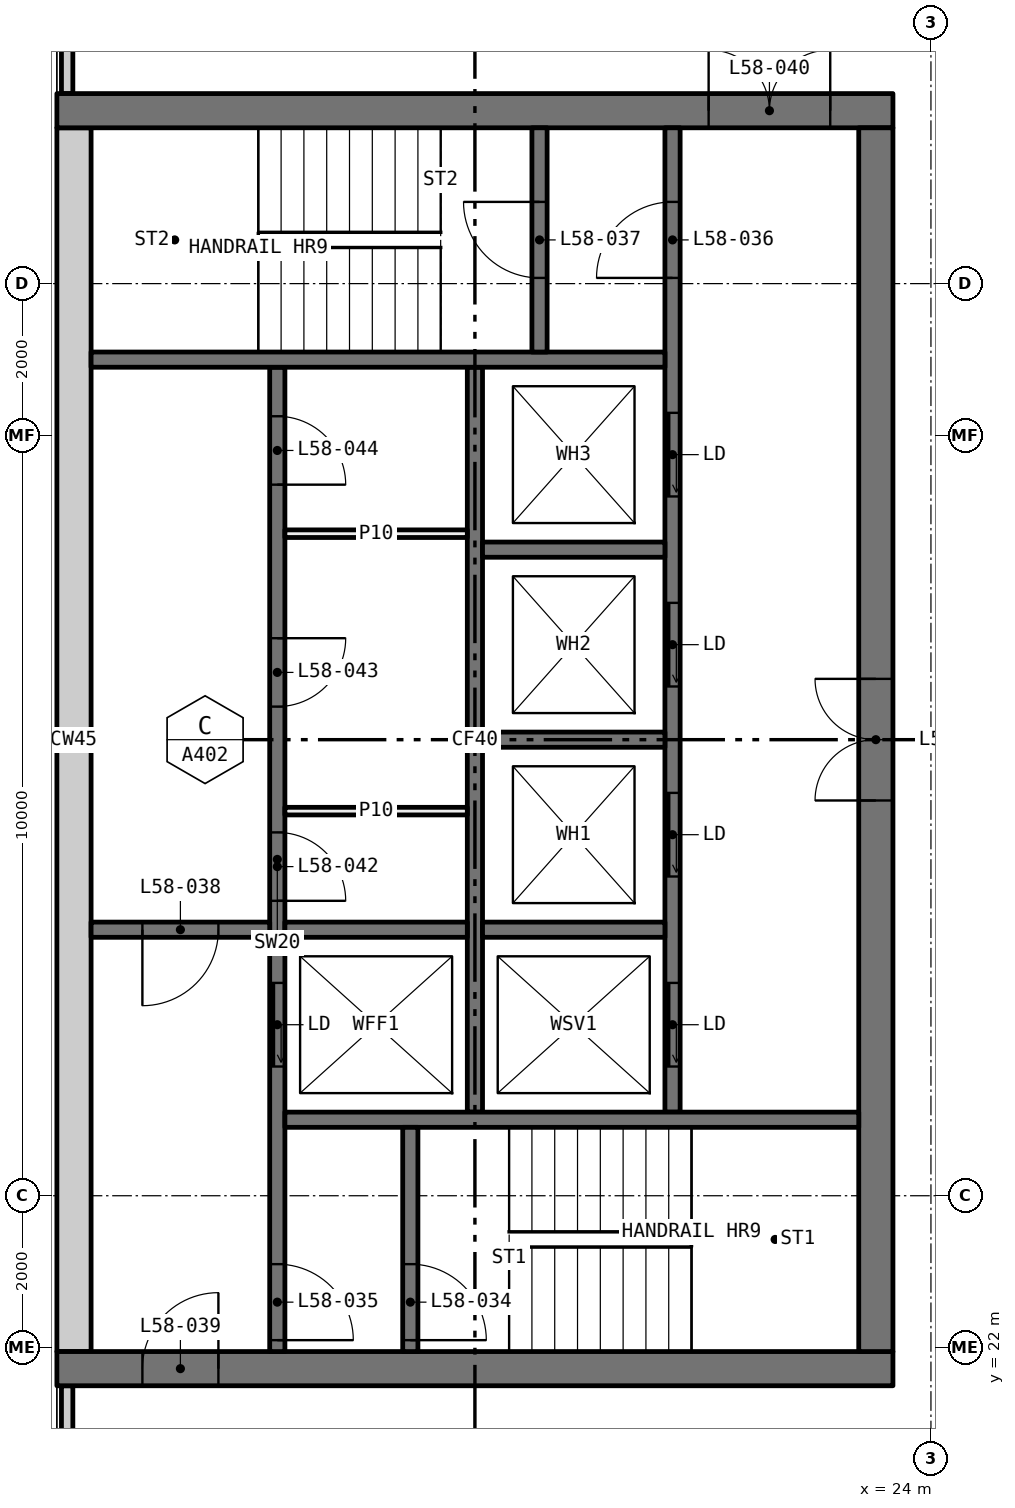
"""IFC4 building model, lengths in metres.
Left out: names, types, materials, properties, quantities, classifications, styles, units other than length and angle.
Written with IfcOpenShell. Run it as: python <this file> out.ifc"""

import sys

from ifc_helpers import new_model, si_unit, direction, frame, frame_2d, origin, place, context, subcontext, project, spatial, rectangle, extrude, element, fill, save


model = new_model("IFC4")
c1 = context("Model", 3, precision=1e-05, world=origin(), true_north=direction((0.0, 1.0)))
c2 = subcontext(c1, "Body", "Model", "MODEL_VIEW")
j1 = project(units=[si_unit("LENGTHUNIT", "METRE"), si_unit("PLANEANGLEUNIT", "RADIAN")], contexts=[c1])
p1 = place(None, origin())
s1 = spatial("IfcSite", under=j1, at=p1, CompositionType="ELEMENT")
p2 = place(p1, origin())
s2 = spatial("IfcBuilding", under=s1, at=p2, CompositionType="ELEMENT")
p3 = place(p2, frame((0.0, 0.0, 217.95)))
s3 = spatial("IfcBuildingStorey", under=s2, at=p3, CompositionType="ELEMENT", Elevation=217.95)
for number, where, z_axis, x_axis in (
    (1, (12.635, 18.71, 0.0), (0.0, 0.0, 1.0), (0.0, 1.0, 0.0)),
    (2, (12.635, 38.5, 0.0), (0.0, 0.0, 1.0), (0.0, 1.0, 0.0)),
):
    element("IfcWall", number, at=place(p3, frame(where, z_axis=z_axis, x_axis=x_axis)), inside=s3, PredefinedType="ELEMENTEDWALL", context=c2, shape_type="SweptSolid", body=[
        extrude(rectangle(XDim=2.79, YDim=0.15, at=frame_2d((1.395, 0.0))), origin(), (0.0, 0.0, 1.0), 3.05),
    ])
p4 = place(p3, frame((12.5, 21.725, 0.0), z_axis=(0.0, 0.0, 1.0), x_axis=(1.0, 0.0, 0.0)))
e3 = element("IfcWall", 3, at=p4, inside=s3, PredefinedType="SHEAR", context=c2, shape_type="SweptSolid", body=[
    extrude(rectangle(XDim=11.0, YDim=0.45, at=frame_2d((5.5, 0.0))), origin(), (0.0, 0.0, 1.0), 3.05),
])
p5 = place(p4, frame((1.125, 0.0, 0.0)))
e4 = element("IfcOpeningElement", 4, at=p5, cuts=e3, PredefinedType="OPENING", context=c2, shape_type="SweptSolid", body=[
    extrude(rectangle(XDim=1.0, YDim=2.1, at=frame_2d((0.5, 1.05))), frame((0.0, 0.235, 0.0), z_axis=(0.0, -1.0, 0.0), x_axis=(1.0, 0.0, 0.0)), (0.0, 0.0, 1.0), 0.47),
])
p6 = place(p3, frame((12.5, 38.275, 0.0), z_axis=(0.0, 0.0, 1.0), x_axis=(1.0, 0.0, 0.0)))
e5 = element("IfcWall", 5, at=p6, inside=s3, PredefinedType="SHEAR", context=c2, shape_type="SweptSolid", body=[
    extrude(rectangle(XDim=11.0, YDim=0.45, at=frame_2d((5.5, 0.0))), origin(), (0.0, 0.0, 1.0), 3.05),
])
p7 = place(p6, frame((8.575, 0.0, 0.0)))
e6 = element("IfcOpeningElement", 6, at=p7, cuts=e5, PredefinedType="OPENING", context=c2, shape_type="SweptSolid", body=[
    extrude(rectangle(XDim=1.6, YDim=2.1, at=frame_2d((0.8, 1.05))), frame((0.0, 0.235, 0.0), z_axis=(0.0, -1.0, 0.0), x_axis=(1.0, 0.0, 0.0)), (0.0, 0.0, 1.0), 0.47),
])
p8 = place(p3, frame((12.725, 21.95, 0.0), z_axis=(0.0, 0.0, 1.0), x_axis=(0.0, 1.0, 0.0)))
e7 = element("IfcWall", 7, at=p8, inside=s3, PredefinedType="SHEAR", context=c2, shape_type="SweptSolid", body=[
    extrude(rectangle(XDim=16.1, YDim=0.45, at=frame_2d((8.05, 0.0))), origin(), (0.0, 0.0, 1.0), 3.05),
])
p9 = place(p3, frame((23.275, 21.95, 0.0), z_axis=(0.0, 0.0, 1.0), x_axis=(0.0, 1.0, 0.0)))
e8 = element("IfcWall", 8, at=p9, inside=s3, PredefinedType="SHEAR", context=c2, shape_type="SweptSolid", body=[
    extrude(rectangle(XDim=16.1, YDim=0.45, at=frame_2d((8.05, 0.0))), origin(), (0.0, 0.0, 1.0), 3.05),
])
p10 = place(p9, frame((7.25, 0.0, 0.0)))
e9 = element("IfcOpeningElement", 9, at=p10, cuts=e8, PredefinedType="OPENING", context=c2, shape_type="SweptSolid", body=[
    extrude(rectangle(XDim=1.6, YDim=2.1, at=frame_2d((0.8, 1.05))), frame((0.0, 0.235, 0.0), z_axis=(0.0, -1.0, 0.0), x_axis=(1.0, 0.0, 0.0)), (0.0, 0.0, 1.0), 0.47),
])
p11 = place(p3, frame((15.4, 21.95, 0.0), z_axis=(0.0, 0.0, 1.0), x_axis=(0.0, 1.0, 0.0)))
e10 = element("IfcWall", 10, at=p11, inside=s3, PredefinedType="SOLIDWALL", context=c2, shape_type="SweptSolid", body=[
    extrude(rectangle(XDim=12.95, YDim=0.2, at=frame_2d((6.475, 0.0))), origin(), (0.0, 0.0, 1.0), 3.05),
])
p12 = place(p11, frame((3.75, 0.0, 0.0)))
e11 = element("IfcOpeningElement", 11, at=p12, cuts=e10, PredefinedType="OPENING", context=c2, shape_type="SweptSolid", body=[
    extrude(rectangle(XDim=1.1, YDim=2.1, at=frame_2d((0.55, 1.05))), frame((0.0, 0.11, 0.0), z_axis=(0.0, -1.0, 0.0), x_axis=(1.0, 0.0, 0.0)), (0.0, 0.0, 1.0), 0.22),
])
p13 = place(p11, frame((0.15, 0.0, 0.0)))
e12 = element("IfcOpeningElement", 12, at=p13, cuts=e10, PredefinedType="OPENING", context=c2, shape_type="SweptSolid", body=[
    extrude(rectangle(XDim=1.0, YDim=2.1, at=frame_2d((0.5, 1.05))), frame((0.0, 0.11, 0.0), z_axis=(0.0, -1.0, 0.0), x_axis=(1.0, 0.0, 0.0)), (0.0, 0.0, 1.0), 0.22),
])
p14 = place(p11, frame((5.93, 0.0, 0.0)))
e13 = element("IfcOpeningElement", 13, at=p14, cuts=e10, PredefinedType="OPENING", context=c2, shape_type="SweptSolid", body=[
    extrude(rectangle(XDim=0.9, YDim=2.1, at=frame_2d((0.45, 1.05))), frame((0.0, 0.11, 0.0), z_axis=(0.0, -1.0, 0.0), x_axis=(1.0, 0.0, 0.0)), (0.0, 0.0, 1.0), 0.22),
])
p15 = place(p11, frame((8.485, 0.0, 0.0)))
e14 = element("IfcOpeningElement", 14, at=p15, cuts=e10, PredefinedType="OPENING", context=c2, shape_type="SweptSolid", body=[
    extrude(rectangle(XDim=0.9, YDim=2.1, at=frame_2d((0.45, 1.05))), frame((0.0, 0.11, 0.0), z_axis=(0.0, -1.0, 0.0), x_axis=(1.0, 0.0, 0.0)), (0.0, 0.0, 1.0), 0.22),
])
p16 = place(p11, frame((11.405, 0.0, 0.0)))
e15 = element("IfcOpeningElement", 15, at=p16, cuts=e10, PredefinedType="OPENING", context=c2, shape_type="SweptSolid", body=[
    extrude(rectangle(XDim=0.9, YDim=2.1, at=frame_2d((0.45, 1.05))), frame((0.0, 0.11, 0.0), z_axis=(0.0, -1.0, 0.0), x_axis=(1.0, 0.0, 0.0)), (0.0, 0.0, 1.0), 0.22),
])
p17 = place(p3, frame((20.6, 25.1, 0.0), z_axis=(0.0, 0.0, 1.0), x_axis=(0.0, 1.0, 0.0)))
e16 = element("IfcWall", 16, at=p17, inside=s3, PredefinedType="SOLIDWALL", context=c2, shape_type="SweptSolid", body=[
    extrude(rectangle(XDim=12.95, YDim=0.2, at=frame_2d((6.475, 0.0))), origin(), (0.0, 0.0, 1.0), 3.05),
])
p18 = place(p17, frame((0.6, 0.0, 0.0)))
e17 = element("IfcOpeningElement", 17, at=p18, cuts=e16, PredefinedType="OPENING", context=c2, shape_type="SweptSolid", body=[
    extrude(rectangle(XDim=1.1, YDim=2.1, at=frame_2d((0.55, 1.05))), frame((0.0, 0.11, 0.0), z_axis=(0.0, -1.0, 0.0), x_axis=(1.0, 0.0, 0.0)), (0.0, 0.0, 1.0), 0.22),
])
p19 = place(p17, frame((3.1, 0.0, 0.0)))
e18 = element("IfcOpeningElement", 18, at=p19, cuts=e16, PredefinedType="OPENING", context=c2, shape_type="SweptSolid", body=[
    extrude(rectangle(XDim=1.1, YDim=2.1, at=frame_2d((0.55, 1.05))), frame((0.0, 0.11, 0.0), z_axis=(0.0, -1.0, 0.0), x_axis=(1.0, 0.0, 0.0)), (0.0, 0.0, 1.0), 0.22),
])
p20 = place(p17, frame((5.6, 0.0, 0.0)))
e19 = element("IfcOpeningElement", 19, at=p20, cuts=e16, PredefinedType="OPENING", context=c2, shape_type="SweptSolid", body=[
    extrude(rectangle(XDim=1.1, YDim=2.1, at=frame_2d((0.55, 1.05))), frame((0.0, 0.11, 0.0), z_axis=(0.0, -1.0, 0.0), x_axis=(1.0, 0.0, 0.0)), (0.0, 0.0, 1.0), 0.22),
])
p21 = place(p17, frame((8.1, 0.0, 0.0)))
e20 = element("IfcOpeningElement", 20, at=p21, cuts=e16, PredefinedType="OPENING", context=c2, shape_type="SweptSolid", body=[
    extrude(rectangle(XDim=1.1, YDim=2.1, at=frame_2d((0.55, 1.05))), frame((0.0, 0.11, 0.0), z_axis=(0.0, -1.0, 0.0), x_axis=(1.0, 0.0, 0.0)), (0.0, 0.0, 1.0), 0.22),
])
p22 = place(p17, frame((10.975, 0.0, 0.0)))
e21 = element("IfcOpeningElement", 21, at=p22, cuts=e16, PredefinedType="OPENING", context=c2, shape_type="SweptSolid", body=[
    extrude(rectangle(XDim=1.0, YDim=2.1, at=frame_2d((0.5, 1.05))), frame((0.0, 0.11, 0.0), z_axis=(0.0, -1.0, 0.0), x_axis=(1.0, 0.0, 0.0)), (0.0, 0.0, 1.0), 0.22),
])
p23 = place(p3, frame((18.0, 25.1, 0.0), z_axis=(0.0, 0.0, 1.0), x_axis=(0.0, 1.0, 0.0)))
e22 = element("IfcWall", 22, at=p23, inside=s3, PredefinedType="SOLIDWALL", context=c2, shape_type="SweptSolid", body=[
    extrude(rectangle(XDim=9.8, YDim=0.2, at=frame_2d((4.9, 0.0))), origin(), (0.0, 0.0, 1.0), 3.05),
])
for number, where, z_axis, x_axis in (
    (23, (15.5, 25.0, 0.0), (0.0, 0.0, 1.0), (1.0, 0.0, 0.0)),
    (24, (12.95, 35.0, 0.0), (0.0, 0.0, 1.0), (1.0, 0.0, 0.0)),
):
    element("IfcWall", number, at=place(p3, frame(where, z_axis=z_axis, x_axis=x_axis)), inside=s3, PredefinedType="SOLIDWALL", context=c2, shape_type="SweptSolid", body=[
        extrude(rectangle(XDim=7.55, YDim=0.2, at=frame_2d((3.775, 0.0))), origin(), (0.0, 0.0, 1.0), 3.05),
    ])
p24 = place(p3, frame((12.95, 27.5, 0.0), z_axis=(0.0, 0.0, 1.0), x_axis=(1.0, 0.0, 0.0)))
e25 = element("IfcWall", 25, at=p24, inside=s3, PredefinedType="SOLIDWALL", context=c2, shape_type="SweptSolid", body=[
    extrude(rectangle(XDim=2.35, YDim=0.2, at=frame_2d((1.175, 0.0))), origin(), (0.0, 0.0, 1.0), 3.05),
])
p25 = place(p24, frame((0.675, 0.0, 0.0)))
e26 = element("IfcOpeningElement", 26, at=p25, cuts=e25, PredefinedType="OPENING", context=c2, shape_type="SweptSolid", body=[
    extrude(rectangle(XDim=1.0, YDim=2.1, at=frame_2d((0.5, 1.05))), frame((0.0, 0.11, 0.0), z_axis=(0.0, -1.0, 0.0), x_axis=(1.0, 0.0, 0.0)), (0.0, 0.0, 1.0), 0.22),
])
p26 = place(p3, frame((17.15, 21.95, 0.0), z_axis=(0.0, 0.0, 1.0), x_axis=(0.0, 1.0, 0.0)))
e27 = element("IfcWall", 27, at=p26, inside=s3, PredefinedType="SOLIDWALL", context=c2, shape_type="SweptSolid", body=[
    extrude(rectangle(XDim=2.95, YDim=0.2, at=frame_2d((1.475, 0.0))), origin(), (0.0, 0.0, 1.0), 3.05),
])
p27 = place(p26, frame((0.15, 0.0, 0.0)))
e28 = element("IfcOpeningElement", 28, at=p27, cuts=e27, PredefinedType="OPENING", context=c2, shape_type="SweptSolid", body=[
    extrude(rectangle(XDim=1.0, YDim=2.1, at=frame_2d((0.5, 1.05))), frame((0.0, 0.11, 0.0), z_axis=(0.0, -1.0, 0.0), x_axis=(1.0, 0.0, 0.0)), (0.0, 0.0, 1.0), 0.22),
])
p28 = place(p3, frame((18.85, 35.1, 0.0), z_axis=(0.0, 0.0, 1.0), x_axis=(0.0, 1.0, 0.0)))
e29 = element("IfcWall", 29, at=p28, inside=s3, PredefinedType="SOLIDWALL", context=c2, shape_type="SweptSolid", body=[
    extrude(rectangle(XDim=2.95, YDim=0.2, at=frame_2d((1.475, 0.0))), origin(), (0.0, 0.0, 1.0), 3.05),
])
p29 = place(p28, frame((0.975, 0.0, 0.0)))
e30 = element("IfcOpeningElement", 30, at=p29, cuts=e29, PredefinedType="OPENING", context=c2, shape_type="SweptSolid", body=[
    extrude(rectangle(XDim=1.0, YDim=2.1, at=frame_2d((0.5, 1.05))), frame((0.0, 0.11, 0.0), z_axis=(0.0, -1.0, 0.0), x_axis=(1.0, 0.0, 0.0)), (0.0, 0.0, 1.0), 0.22),
])
for number, where, z_axis, x_axis in (
    (31, (15.5, 27.5, 0.0), (0.0, 0.0, 1.0), (1.0, 0.0, 0.0)),
    (32, (18.1, 27.5, 0.0), (0.0, 0.0, 1.0), (1.0, 0.0, 0.0)),
    (33, (18.1, 30.0, 0.0), (0.0, 0.0, 1.0), (1.0, 0.0, 0.0)),
    (34, (18.1, 32.5, 0.0), (0.0, 0.0, 1.0), (1.0, 0.0, 0.0)),
):
    element("IfcWall", number, at=place(p3, frame(where, z_axis=z_axis, x_axis=x_axis)), inside=s3, PredefinedType="SOLIDWALL", context=c2, shape_type="SweptSolid", body=[
        extrude(rectangle(XDim=2.4, YDim=0.2, at=frame_2d((1.2, 0.0))), origin(), (0.0, 0.0, 1.0), 3.05),
    ])
for number, where, z_axis, x_axis in (
    (35, (15.5, 29.06, 0.0), (0.0, 0.0, 1.0), (1.0, 0.0, 0.0)),
    (36, (15.5, 32.71, 0.0), (0.0, 0.0, 1.0), (1.0, 0.0, 0.0)),
):
    element("IfcWall", number, at=place(p3, frame(where, z_axis=z_axis, x_axis=x_axis)), inside=s3, PredefinedType="PARTITIONING", context=c2, shape_type="SweptSolid", body=[
        extrude(rectangle(XDim=2.4, YDim=0.1, at=frame_2d((1.2, 0.0))), origin(), (0.0, 0.0, 1.0), 3.05),
    ])
p30 = place(p18, origin())
e37 = element("IfcDoor", 37, at=p30, inside=s3, OperationType="SLIDING_TO_LEFT", PredefinedType="DOOR", context=c2, shape_type="SweptSolid", body=[
    extrude(rectangle(XDim=1.1, YDim=2.1, at=frame_2d((0.55, 1.05))), frame((0.0, 0.025, 0.0), z_axis=(0.0, -1.0, 0.0), x_axis=(1.0, 0.0, 0.0)), (0.0, 0.0, 1.0), 0.05),
])
fill(e17, e37)
p31 = place(p19, origin())
e38 = element("IfcDoor", 38, at=p31, inside=s3, OperationType="SLIDING_TO_LEFT", PredefinedType="DOOR", context=c2, shape_type="SweptSolid", body=[
    extrude(rectangle(XDim=1.1, YDim=2.1, at=frame_2d((0.55, 1.05))), frame((0.0, 0.025, 0.0), z_axis=(0.0, -1.0, 0.0), x_axis=(1.0, 0.0, 0.0)), (0.0, 0.0, 1.0), 0.05),
])
fill(e18, e38)
p32 = place(p20, origin())
e39 = element("IfcDoor", 39, at=p32, inside=s3, OperationType="SLIDING_TO_LEFT", PredefinedType="DOOR", context=c2, shape_type="SweptSolid", body=[
    extrude(rectangle(XDim=1.1, YDim=2.1, at=frame_2d((0.55, 1.05))), frame((0.0, 0.025, 0.0), z_axis=(0.0, -1.0, 0.0), x_axis=(1.0, 0.0, 0.0)), (0.0, 0.0, 1.0), 0.05),
])
fill(e19, e39)
p33 = place(p21, origin())
e40 = element("IfcDoor", 40, at=p33, inside=s3, OperationType="SLIDING_TO_LEFT", PredefinedType="DOOR", context=c2, shape_type="SweptSolid", body=[
    extrude(rectangle(XDim=1.1, YDim=2.1, at=frame_2d((0.55, 1.05))), frame((0.0, 0.025, 0.0), z_axis=(0.0, -1.0, 0.0), x_axis=(1.0, 0.0, 0.0)), (0.0, 0.0, 1.0), 0.05),
])
fill(e20, e40)
p34 = place(p12, origin())
e41 = element("IfcDoor", 41, at=p34, inside=s3, OperationType="SLIDING_TO_LEFT", PredefinedType="DOOR", context=c2, shape_type="SweptSolid", body=[
    extrude(rectangle(XDim=1.1, YDim=2.1, at=frame_2d((0.55, 1.05))), frame((0.0, 0.025, 0.0), z_axis=(0.0, -1.0, 0.0), x_axis=(1.0, 0.0, 0.0)), (0.0, 0.0, 1.0), 0.05),
])
fill(e11, e41)
p35 = place(p27, frame((1.0, 0.0, 0.0), x_axis=(-1.0, 0.0, 0.0)))
e42 = element("IfcDoor", 42, at=p35, inside=s3, OperationType="SINGLE_SWING_LEFT", PredefinedType="DOOR", context=c2, shape_type="SweptSolid", body=[
    extrude(rectangle(XDim=1.0, YDim=2.1, at=frame_2d((0.5, 1.05))), frame((0.0, 0.025, 0.0), z_axis=(0.0, -1.0, 0.0), x_axis=(1.0, 0.0, 0.0)), (0.0, 0.0, 1.0), 0.05),
])
fill(e28, e42)
p36 = place(p13, frame((1.0, 0.0, 0.0), x_axis=(-1.0, 0.0, 0.0)))
e43 = element("IfcDoor", 43, at=p36, inside=s3, OperationType="SINGLE_SWING_LEFT", PredefinedType="DOOR", context=c2, shape_type="SweptSolid", body=[
    extrude(rectangle(XDim=1.0, YDim=2.1, at=frame_2d((0.5, 1.05))), frame((0.0, 0.025, 0.0), z_axis=(0.0, -1.0, 0.0), x_axis=(1.0, 0.0, 0.0)), (0.0, 0.0, 1.0), 0.05),
])
fill(e12, e43)
p37 = place(p22, origin())
e44 = element("IfcDoor", 44, at=p37, inside=s3, OperationType="SINGLE_SWING_RIGHT", PredefinedType="DOOR", context=c2, shape_type="SweptSolid", body=[
    extrude(rectangle(XDim=1.0, YDim=2.1, at=frame_2d((0.5, 1.05))), frame((0.0, 0.025, 0.0), z_axis=(0.0, -1.0, 0.0), x_axis=(1.0, 0.0, 0.0)), (0.0, 0.0, 1.0), 0.05),
])
fill(e21, e44)
p38 = place(p29, origin())
e45 = element("IfcDoor", 45, at=p38, inside=s3, OperationType="SINGLE_SWING_LEFT", PredefinedType="DOOR", context=c2, shape_type="SweptSolid", body=[
    extrude(rectangle(XDim=1.0, YDim=2.1, at=frame_2d((0.5, 1.05))), frame((0.0, 0.025, 0.0), z_axis=(0.0, -1.0, 0.0), x_axis=(1.0, 0.0, 0.0)), (0.0, 0.0, 1.0), 0.05),
])
fill(e30, e45)
p39 = place(p25, frame((1.0, 0.0, 0.0), x_axis=(-1.0, 0.0, 0.0)))
e46 = element("IfcDoor", 46, at=p39, inside=s3, OperationType="SINGLE_SWING_LEFT", PredefinedType="DOOR", context=c2, shape_type="SweptSolid", body=[
    extrude(rectangle(XDim=1.0, YDim=2.1, at=frame_2d((0.5, 1.05))), frame((0.0, 0.025, 0.0), z_axis=(0.0, -1.0, 0.0), x_axis=(1.0, 0.0, 0.0)), (0.0, 0.0, 1.0), 0.05),
])
fill(e26, e46)
p40 = place(p5, origin())
e47 = element("IfcDoor", 47, at=p40, inside=s3, OperationType="SINGLE_SWING_LEFT", PredefinedType="DOOR", context=c2, shape_type="SweptSolid", body=[
    extrude(rectangle(XDim=1.0, YDim=2.1, at=frame_2d((0.5, 1.05))), frame((0.0, 0.025, 0.0), z_axis=(0.0, -1.0, 0.0), x_axis=(1.0, 0.0, 0.0)), (0.0, 0.0, 1.0), 0.05),
])
fill(e4, e47)
p41 = place(p7, origin())
e48 = element("IfcDoor", 48, at=p41, inside=s3, OperationType="DOUBLE_DOOR_SINGLE_SWING", PredefinedType="DOOR", context=c2, shape_type="SweptSolid", body=[
    extrude(rectangle(XDim=1.6, YDim=2.1, at=frame_2d((0.8, 1.05))), frame((0.0, 0.025, 0.0), z_axis=(0.0, -1.0, 0.0), x_axis=(1.0, 0.0, 0.0)), (0.0, 0.0, 1.0), 0.05),
])
fill(e6, e48)
p42 = place(p10, origin())
e49 = element("IfcDoor", 49, at=p42, inside=s3, OperationType="DOUBLE_DOOR_SINGLE_SWING", PredefinedType="DOOR", context=c2, shape_type="SweptSolid", body=[
    extrude(rectangle(XDim=1.6, YDim=2.1, at=frame_2d((0.8, 1.05))), frame((0.0, 0.025, 0.0), z_axis=(0.0, -1.0, 0.0), x_axis=(1.0, 0.0, 0.0)), (0.0, 0.0, 1.0), 0.05),
])
fill(e9, e49)
p43 = place(p14, frame((0.9, 0.0, 0.0), x_axis=(-1.0, 0.0, 0.0)))
e50 = element("IfcDoor", 50, at=p43, inside=s3, OperationType="SINGLE_SWING_LEFT", PredefinedType="DOOR", context=c2, shape_type="SweptSolid", body=[
    extrude(rectangle(XDim=0.9, YDim=2.1, at=frame_2d((0.45, 1.05))), frame((0.0, 0.025, 0.0), z_axis=(0.0, -1.0, 0.0), x_axis=(1.0, 0.0, 0.0)), (0.0, 0.0, 1.0), 0.05),
])
fill(e13, e50)
p44 = place(p15, frame((0.9, 0.0, 0.0), x_axis=(-1.0, 0.0, 0.0)))
e51 = element("IfcDoor", 51, at=p44, inside=s3, OperationType="SINGLE_SWING_RIGHT", PredefinedType="DOOR", context=c2, shape_type="SweptSolid", body=[
    extrude(rectangle(XDim=0.9, YDim=2.1, at=frame_2d((0.45, 1.05))), frame((0.0, 0.025, 0.0), z_axis=(0.0, -1.0, 0.0), x_axis=(1.0, 0.0, 0.0)), (0.0, 0.0, 1.0), 0.05),
])
fill(e14, e51)
p45 = place(p16, frame((0.9, 0.0, 0.0), x_axis=(-1.0, 0.0, 0.0)))
e52 = element("IfcDoor", 52, at=p45, inside=s3, OperationType="SINGLE_SWING_LEFT", PredefinedType="DOOR", context=c2, shape_type="SweptSolid", body=[
    extrude(rectangle(XDim=0.9, YDim=2.1, at=frame_2d((0.45, 1.05))), frame((0.0, 0.025, 0.0), z_axis=(0.0, -1.0, 0.0), x_axis=(1.0, 0.0, 0.0)), (0.0, 0.0, 1.0), 0.05),
])
fill(e15, e52)
save(model, sys.argv[1])
